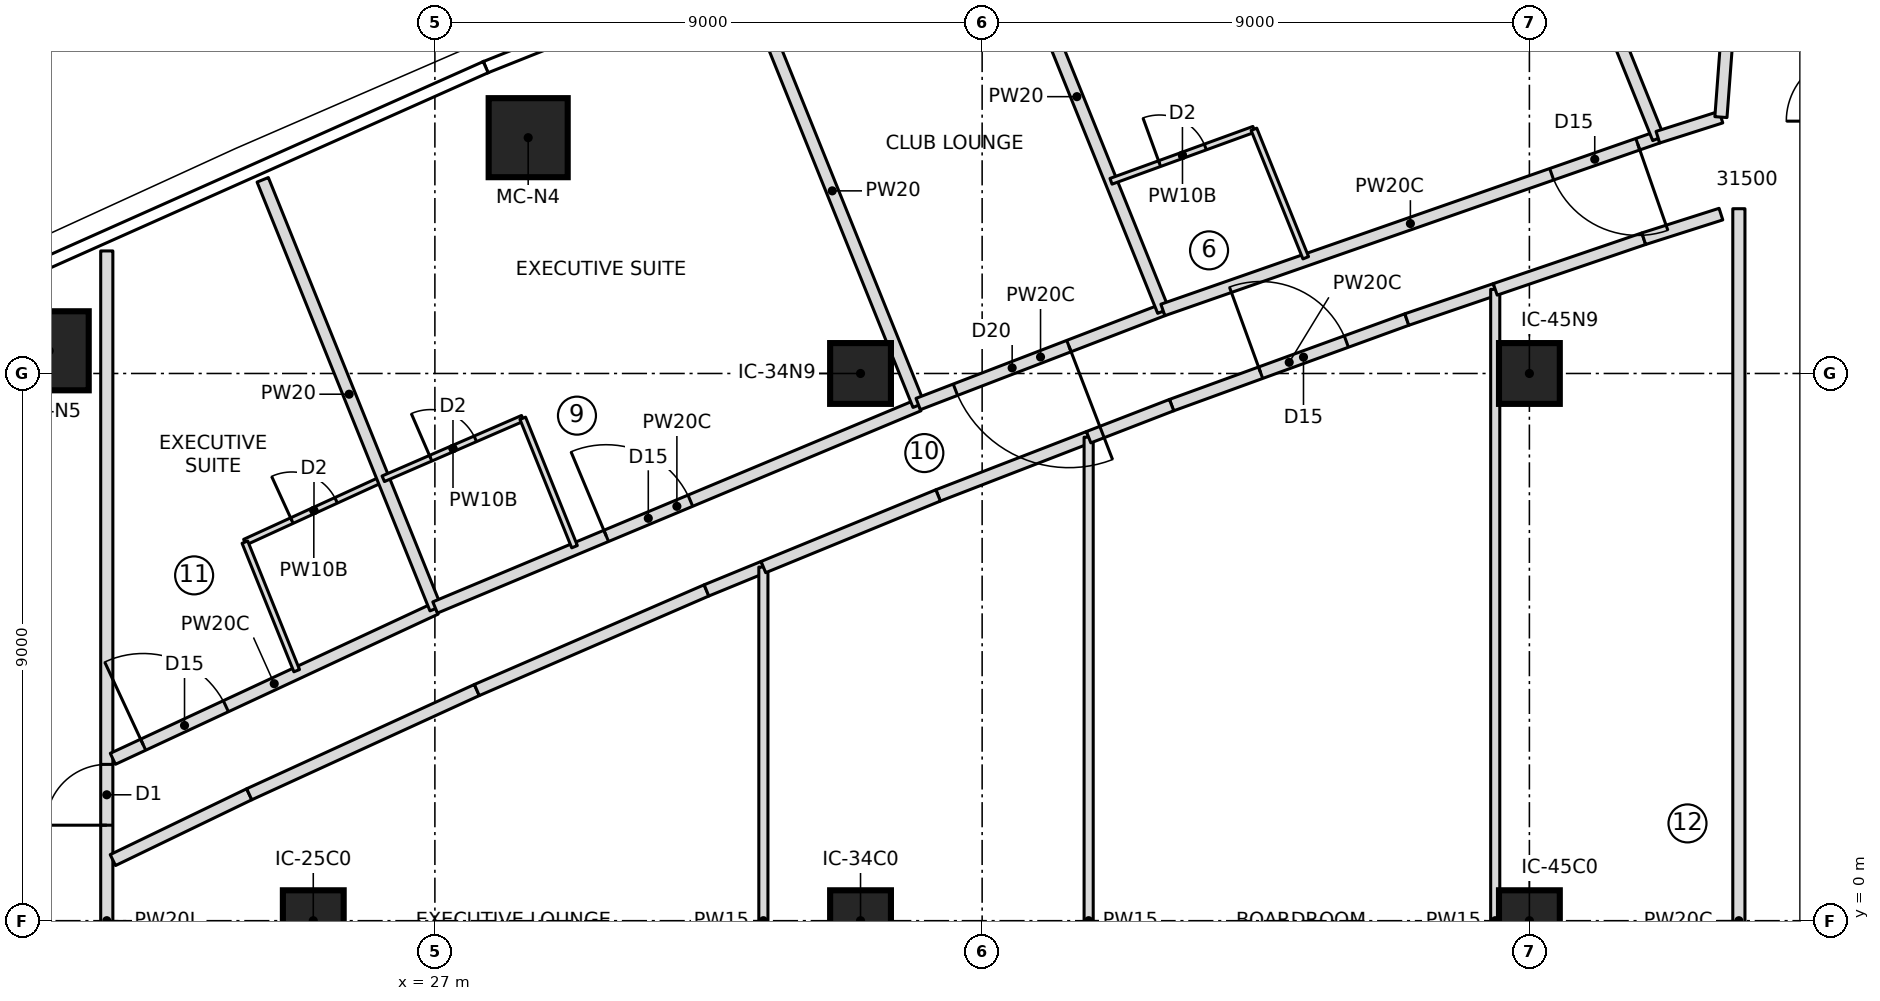
"""IFC4 building model, lengths in metres.
Left out: names, types, materials, properties, quantities, classifications, styles, units other than length and angle.
Written with IfcOpenShell. Run it as: python <this file> out.ifc"""

import sys

from ifc_helpers import new_model, si_unit, direction, frame, frame_2d, origin, origin_2d, place, context, subcontext, project, spatial, rectangle, extrude, element, fill, save


model = new_model("IFC4")
c1 = context("Model", 3, precision=1e-05, world=origin(), true_north=direction((0.0, 1.0)))
c2 = subcontext(c1, "Body", "Model", "MODEL_VIEW")
j1 = project(units=[si_unit("LENGTHUNIT", "METRE"), si_unit("PLANEANGLEUNIT", "RADIAN")], contexts=[c1])
p1 = place(None, origin())
s1 = spatial("IfcSite", under=j1, at=p1, CompositionType="ELEMENT")
p2 = place(p1, origin())
s2 = spatial("IfcBuilding", under=s1, at=p2, CompositionType="ELEMENT")
p3 = place(p2, frame((0.0, 0.0, 200.35)))
s3 = spatial("IfcBuildingStorey", under=s2, at=p3, CompositionType="ELEMENT", Elevation=200.35)
for number, where, z_axis, x_axis in (
    (1, (28.534, 12.878, 0.0), (0.0, 0.0, 1.0), (1.0, 0.0, 0.0)),
    (2, (20.657, 9.373, 0.0), (0.0, 0.0, 1.0), (1.0, 0.0, 0.0)),
):
    element("IfcColumn", number, at=place(p3, frame(where, z_axis=z_axis, x_axis=x_axis)), inside=s3, PredefinedType="COLUMN", context=c2, shape_type="SweptSolid", body=[
        extrude(rectangle(XDim=1.3, YDim=1.3, at=origin_2d()), origin(), (0.0, 0.0, 1.0), 3.55),
    ])
for number, where, z_axis, x_axis in (
    (3, (25.0, 0.0, 0.0), (0.0, 0.0, 1.0), (1.0, 0.0, 0.0)),
    (4, (34.0, 0.0, 0.0), (0.0, 0.0, 1.0), (1.0, 0.0, 0.0)),
    (5, (34.0, 9.0, 0.0), (0.0, 0.0, 1.0), (1.0, 0.0, 0.0)),
    (6, (45.0, 0.0, 0.0), (0.0, 0.0, 1.0), (1.0, 0.0, 0.0)),
    (7, (45.0, 9.0, 0.0), (0.0, 0.0, 1.0), (1.0, 0.0, 0.0)),
):
    element("IfcColumn", number, at=place(p3, frame(where, z_axis=z_axis, x_axis=x_axis)), inside=s3, PredefinedType="COLUMN", context=c2, shape_type="SweptSolid", body=[
        extrude(rectangle(XDim=1.0, YDim=1.0, at=origin_2d()), origin(), (0.0, 0.0, 1.0), 3.55),
    ])
p4 = place(p3, frame((21.604, -11.015, 0.0), z_axis=(0.0, 0.0, 1.0), x_axis=(0.0, 1.0, 0.0)))
e8 = element("IfcWall", 8, at=p4, inside=s3, PredefinedType="PARTITIONING", context=c2, shape_type="SweptSolid", body=[
    extrude(rectangle(XDim=22.031, YDim=0.2, at=frame_2d((11.015, 0.0))), origin(), (0.0, 0.0, 1.0), 3.25),
])
p5 = place(p4, frame((12.586, 0.0, 0.0)))
e9 = element("IfcOpeningElement", 9, at=p5, cuts=e8, PredefinedType="OPENING", context=c2, shape_type="SweptSolid", body=[
    extrude(rectangle(XDim=1.0, YDim=2.1, at=frame_2d((0.5, 1.05))), frame((0.0, 0.11, 0.0), z_axis=(0.0, -1.0, 0.0), x_axis=(1.0, 0.0, 0.0)), (0.0, 0.0, 1.0), 0.22),
])
p6 = place(p4, frame((8.444, 0.0, 0.0)))
e10 = element("IfcOpeningElement", 10, at=p6, cuts=e8, PredefinedType="OPENING", context=c2, shape_type="SweptSolid", body=[
    extrude(rectangle(XDim=1.0, YDim=2.1, at=frame_2d((0.5, 1.05))), frame((0.0, 0.11, 0.0), z_axis=(0.0, -1.0, 0.0), x_axis=(1.0, 0.0, 0.0)), (0.0, 0.0, 1.0), 0.22),
])
p7 = place(p3, frame((21.704, 2.663, 0.0), z_axis=(0.0, 0.0, 1.0), x_axis=(0.906619470853, 0.421949209112, 0.0)))
e11 = element("IfcWall", 11, at=p7, inside=s3, PredefinedType="PARTITIONING", context=c2, shape_type="SweptSolid", body=[
    extrude(rectangle(XDim=5.854, YDim=0.2, at=frame_2d((2.927, 0.0))), origin(), (0.0, 0.0, 1.0), 3.25),
])
p8 = place(p7, frame((0.55, 0.0, 0.0)))
e12 = element("IfcOpeningElement", 12, at=p8, cuts=e11, PredefinedType="OPENING", context=c2, shape_type="SweptSolid", body=[
    extrude(rectangle(XDim=1.5, YDim=2.1, at=frame_2d((0.75, 1.05))), frame((0.0, 0.11, 0.0), z_axis=(0.0, -1.0, 0.0), x_axis=(1.0, 0.0, 0.0)), (0.0, 0.0, 1.0), 0.22),
])
p9 = place(p3, frame((23.875, 6.226, 0.0), z_axis=(0.0, 0.0, 1.0), x_axis=(0.909145169949, 0.416479363183, 0.0)))
e13 = element("IfcWall", 13, at=p9, inside=s3, PredefinedType="PARTITIONING", context=c2, shape_type="SweptSolid", body=[
    extrude(rectangle(XDim=2.493, YDim=0.1, at=frame_2d((1.247, 0.0))), origin(), (0.0, 0.0, 1.0), 3.25),
])
p10 = place(p9, frame((0.85, 0.0, 0.0)))
e14 = element("IfcOpeningElement", 14, at=p10, cuts=e13, PredefinedType="OPENING", context=c2, shape_type="SweptSolid", body=[
    extrude(rectangle(XDim=0.8, YDim=2.1, at=frame_2d((0.4, 1.05))), frame((0.0, 0.06, 0.0), z_axis=(0.0, -1.0, 0.0), x_axis=(1.0, 0.0, 0.0)), (0.0, 0.0, 1.0), 0.12),
])
p11 = place(p3, frame((24.728, 4.112, 0.0), z_axis=(0.0, 0.0, 1.0), x_axis=(-0.373790023037, 0.927513352291, 0.0)))
e15 = element("IfcWall", 15, at=p11, inside=s3, PredefinedType="PARTITIONING", context=c2, shape_type="SweptSolid", body=[
    extrude(rectangle(XDim=2.28, YDim=0.1, at=frame_2d((1.14, 0.0))), origin(), (0.0, 0.0, 1.0), 3.25),
])
p12 = place(p3, frame((27.012, 5.133, 0.0), z_axis=(0.0, 0.0, 1.0), x_axis=(-0.373913547423, 0.927463562116, 0.0)))
e16 = element("IfcWall", 16, at=p12, inside=s3, PredefinedType="PARTITIONING", context=c2, shape_type="SweptSolid", body=[
    extrude(rectangle(XDim=7.604, YDim=0.2, at=frame_2d((3.802, 0.0))), origin(), (0.0, 0.0, 1.0), 3.25),
])
p13 = place(p3, frame((27.004, 5.151, 0.0), z_axis=(0.0, 0.0, 1.0), x_axis=(0.922490953728, 0.386018704586, 0.0)))
e17 = element("IfcWall", 17, at=p13, inside=s3, PredefinedType="PARTITIONING", context=c2, shape_type="SweptSolid", body=[
    extrude(rectangle(XDim=8.62, YDim=0.2, at=frame_2d((4.31, 0.0))), origin(), (0.0, 0.0, 1.0), 3.25),
])
p14 = place(p13, frame((3.05, 0.0, 0.0)))
e18 = element("IfcOpeningElement", 18, at=p14, cuts=e17, PredefinedType="OPENING", context=c2, shape_type="SweptSolid", body=[
    extrude(rectangle(XDim=1.5, YDim=2.1, at=frame_2d((0.75, 1.05))), frame((0.0, 0.11, 0.0), z_axis=(0.0, -1.0, 0.0), x_axis=(1.0, 0.0, 0.0)), (0.0, 0.0, 1.0), 0.22),
])
p15 = place(p3, frame((26.151, 7.268, 0.0), z_axis=(0.0, 0.0, 1.0), x_axis=(0.917378641232, 0.398015613526, 0.0)))
e19 = element("IfcWall", 19, at=p15, inside=s3, PredefinedType="PARTITIONING", context=c2, shape_type="SweptSolid", body=[
    extrude(rectangle(XDim=2.501, YDim=0.1, at=frame_2d((1.25, 0.0))), origin(), (0.0, 0.0, 1.0), 3.25),
])
p16 = place(p15, frame((0.85, 0.0, 0.0)))
e20 = element("IfcOpeningElement", 20, at=p16, cuts=e19, PredefinedType="OPENING", context=c2, shape_type="SweptSolid", body=[
    extrude(rectangle(XDim=0.8, YDim=2.1, at=frame_2d((0.4, 1.05))), frame((0.0, 0.06, 0.0), z_axis=(0.0, -1.0, 0.0), x_axis=(1.0, 0.0, 0.0)), (0.0, 0.0, 1.0), 0.12),
])
p17 = place(p3, frame((28.445, 8.263, 0.0), z_axis=(0.0, 0.0, 1.0), x_axis=(0.373902898623, -0.927467855185, 0.0)))
e21 = element("IfcWall", 21, at=p17, inside=s3, PredefinedType="PARTITIONING", context=c2, shape_type="SweptSolid", body=[
    extrude(rectangle(XDim=2.278, YDim=0.1, at=frame_2d((1.139, 0.0))), origin(), (0.0, 0.0, 1.0), 3.25),
])
p18 = place(p3, frame((34.956, 8.479, 0.0), z_axis=(0.0, 0.0, 1.0), x_axis=(-0.373881438439, 0.927476506436, 0.0)))
e22 = element("IfcWall", 22, at=p18, inside=s3, PredefinedType="PARTITIONING", context=c2, shape_type="SweptSolid", body=[
    extrude(rectangle(XDim=7.601, YDim=0.2, at=frame_2d((3.8, 0.0))), origin(), (0.0, 0.0, 1.0), 3.25),
])
p19 = place(p3, frame((38.972, 10.045, 0.0), z_axis=(0.0, 0.0, 1.0), x_axis=(-0.93335728106, -0.358948723208, 0.0)))
e23 = element("IfcWall", 23, at=p19, inside=s3, PredefinedType="PARTITIONING", context=c2, shape_type="SweptSolid", body=[
    extrude(rectangle(XDim=4.312, YDim=0.2, at=frame_2d((2.156, 0.0))), origin(), (0.0, 0.0, 1.0), 3.25),
])
p20 = place(p19, frame((1.656, 0.0, 0.0)))
e24 = element("IfcOpeningElement", 24, at=p20, cuts=e23, PredefinedType="OPENING", context=c2, shape_type="SweptSolid", body=[
    extrude(rectangle(XDim=2.0, YDim=2.4, at=frame_2d((1.0, 1.2))), frame((0.0, 0.11, 0.0), z_axis=(0.0, -1.0, 0.0), x_axis=(1.0, 0.0, 0.0)), (0.0, 0.0, 1.0), 0.22),
])
p21 = place(p3, frame((38.98, 10.026, 0.0), z_axis=(0.0, 0.0, 1.0), x_axis=(-0.373863662938, 0.927483671843, 0.0)))
e25 = element("IfcWall", 25, at=p21, inside=s3, PredefinedType="PARTITIONING", context=c2, shape_type="SweptSolid", body=[
    extrude(rectangle(XDim=7.604, YDim=0.2, at=frame_2d((3.802, 0.0))), origin(), (0.0, 0.0, 1.0), 3.25),
])
p22 = place(p3, frame((47.113, 12.886, 0.0), z_axis=(0.0, 0.0, 1.0), x_axis=(-0.944155939639, -0.329498955453, 0.0)))
e26 = element("IfcWall", 26, at=p22, inside=s3, PredefinedType="PARTITIONING", context=c2, shape_type="SweptSolid", body=[
    extrude(rectangle(XDim=8.622, YDim=0.2, at=frame_2d((4.311, 0.0))), origin(), (0.0, 0.0, 1.0), 3.25),
])
p23 = place(p22, frame((0.35, 0.0, 0.0)))
e27 = element("IfcOpeningElement", 27, at=p23, cuts=e26, PredefinedType="OPENING", context=c2, shape_type="SweptSolid", body=[
    extrude(rectangle(XDim=1.5, YDim=2.1, at=frame_2d((0.75, 1.05))), frame((0.0, 0.11, 0.0), z_axis=(0.0, -1.0, 0.0), x_axis=(1.0, 0.0, 0.0)), (0.0, 0.0, 1.0), 0.22),
])
p24 = place(p3, frame((38.119, 12.161, 0.0), z_axis=(0.0, 0.0, 1.0), x_axis=(0.939744972593, 0.341876273652, 0.0)))
e28 = element("IfcWall", 28, at=p24, inside=s3, PredefinedType="PARTITIONING", context=c2, shape_type="SweptSolid", body=[
    extrude(rectangle(XDim=2.501, YDim=0.1, at=frame_2d((1.251, 0.0))), origin(), (0.0, 0.0, 1.0), 3.25),
])
p25 = place(p24, frame((0.85, 0.0, 0.0)))
e29 = element("IfcOpeningElement", 29, at=p25, cuts=e28, PredefinedType="OPENING", context=c2, shape_type="SweptSolid", body=[
    extrude(rectangle(XDim=0.8, YDim=2.1, at=frame_2d((0.4, 1.05))), frame((0.0, 0.06, 0.0), z_axis=(0.0, -1.0, 0.0), x_axis=(1.0, 0.0, 0.0)), (0.0, 0.0, 1.0), 0.12),
])
p26 = place(p3, frame((40.47, 13.016, 0.0), z_axis=(0.0, 0.0, 1.0), x_axis=(0.373846436826, -0.927490615409, 0.0)))
e30 = element("IfcWall", 30, at=p26, inside=s3, PredefinedType="PARTITIONING", context=c2, shape_type="SweptSolid", body=[
    extrude(rectangle(XDim=2.279, YDim=0.1, at=frame_2d((1.139, 0.0))), origin(), (0.0, 0.0, 1.0), 3.25),
])
p27 = place(p3, frame((47.121, 12.867, 0.0), z_axis=(0.0, 0.0, 1.0), x_axis=(-0.373907892596, 0.92746584188, 0.0)))
e31 = element("IfcWall", 31, at=p27, inside=s3, PredefinedType="PARTITIONING", context=c2, shape_type="SweptSolid", body=[
    extrude(rectangle(XDim=7.621, YDim=0.2, at=frame_2d((3.811, 0.0))), origin(), (0.0, 0.0, 1.0), 3.25),
])
p28 = place(p3, frame((21.704, 0.997, 0.0), z_axis=(0.0, 0.0, 1.0), x_axis=(0.900633695148, 0.434579045933, 0.0)))
e32 = element("IfcWall", 32, at=p28, inside=s3, PredefinedType="PARTITIONING", context=c2, shape_type="SweptSolid", body=[
    extrude(rectangle(XDim=2.49, YDim=0.2, at=frame_2d((1.245, 0.0))), origin(), (0.0, 0.0, 1.0), 3.25),
])
p29 = place(p3, frame((23.947, 2.079, 0.0), z_axis=(0.0, 0.0, 1.0), x_axis=(0.909180834404, 0.416401501382, 0.0)))
e33 = element("IfcWall", 33, at=p29, inside=s3, PredefinedType="PARTITIONING", context=c2, shape_type="SweptSolid", body=[
    extrude(rectangle(XDim=4.117, YDim=0.2, at=frame_2d((2.059, 0.0))), origin(), (0.0, 0.0, 1.0), 3.25),
])
p30 = place(p3, frame((27.69, 3.793, 0.0), z_axis=(0.0, 0.0, 1.0), x_axis=(0.917375244839, 0.398023441717, 0.0)))
e34 = element("IfcWall", 34, at=p30, inside=s3, PredefinedType="PARTITIONING", context=c2, shape_type="SweptSolid", body=[
    extrude(rectangle(XDim=4.117, YDim=0.2, at=frame_2d((2.059, 0.0))), origin(), (0.0, 0.0, 1.0), 3.25),
])
p31 = place(p3, frame((31.467, 5.432, 0.0), z_axis=(0.0, 0.0, 1.0), x_axis=(0.925212079844, 0.379450401648, 0.0)))
e35 = element("IfcWall", 35, at=p31, inside=s3, PredefinedType="PARTITIONING", context=c2, shape_type="SweptSolid", body=[
    extrude(rectangle(XDim=1.011, YDim=0.2, at=frame_2d((0.506, 0.0))), origin(), (0.0, 0.0, 1.0), 3.25),
])
p32 = place(p3, frame((32.402, -5.816, 0.0), z_axis=(0.0, 0.0, 1.0), x_axis=(0.0, 1.0, 0.0)))
e36 = element("IfcWall", 36, at=p32, inside=s3, PredefinedType="PARTITIONING", context=c2, shape_type="SweptSolid", body=[
    extrude(rectangle(XDim=11.632, YDim=0.15, at=frame_2d((5.816, 0.0))), origin(), (0.0, 0.0, 1.0), 3.25),
])
p33 = place(p3, frame((35.276, 6.994, 0.0), z_axis=(0.0, 0.0, 1.0), x_axis=(0.932689885878, 0.360679326801, 0.0)))
e37 = element("IfcWall", 37, at=p33, inside=s3, PredefinedType="PARTITIONING", context=c2, shape_type="SweptSolid", body=[
    extrude(rectangle(XDim=2.655, YDim=0.2, at=frame_2d((1.327, 0.0))), origin(), (0.0, 0.0, 1.0), 3.25),
])
p34 = place(p3, frame((32.402, 5.816, 0.0), z_axis=(0.0, 0.0, 1.0), x_axis=(0.925204713675, 0.379468362045, 0.0)))
e38 = element("IfcWall", 38, at=p34, inside=s3, PredefinedType="PARTITIONING", context=c2, shape_type="SweptSolid", body=[
    extrude(rectangle(XDim=3.105, YDim=0.2, at=frame_2d((1.553, 0.0))), origin(), (0.0, 0.0, 1.0), 3.25),
])
p35 = place(p3, frame((37.752, -7.952, 0.0), z_axis=(0.0, 0.0, 1.0), x_axis=(0.0, 1.0, 0.0)))
e39 = element("IfcWall", 39, at=p35, inside=s3, PredefinedType="PARTITIONING", context=c2, shape_type="SweptSolid", body=[
    extrude(rectangle(XDim=15.904, YDim=0.15, at=frame_2d((7.952, 0.0))), origin(), (0.0, 0.0, 1.0), 3.25),
])
p36 = place(p3, frame((39.115, 8.479, 0.0), z_axis=(0.0, 0.0, 1.0), x_axis=(0.939727613335, 0.341923986779, 0.0)))
e40 = element("IfcWall", 40, at=p36, inside=s3, PredefinedType="PARTITIONING", context=c2, shape_type="SweptSolid", body=[
    extrude(rectangle(XDim=4.117, YDim=0.2, at=frame_2d((2.059, 0.0))), origin(), (0.0, 0.0, 1.0), 3.25),
])
p37 = place(p36, frame((1.559, 0.0, 0.0)))
e41 = element("IfcOpeningElement", 41, at=p37, cuts=e40, PredefinedType="OPENING", context=c2, shape_type="SweptSolid", body=[
    extrude(rectangle(XDim=1.5, YDim=2.1, at=frame_2d((0.75, 1.05))), frame((0.0, 0.11, 0.0), z_axis=(0.0, -1.0, 0.0), x_axis=(1.0, 0.0, 0.0)), (0.0, 0.0, 1.0), 0.22),
])
p38 = place(p3, frame((42.984, 9.887, 0.0), z_axis=(0.0, 0.0, 1.0), x_axis=(0.946450589454, 0.32284869788, 0.0)))
e42 = element("IfcWall", 42, at=p38, inside=s3, PredefinedType="PARTITIONING", context=c2, shape_type="SweptSolid", body=[
    extrude(rectangle(XDim=1.536, YDim=0.2, at=frame_2d((0.768, 0.0))), origin(), (0.0, 0.0, 1.0), 3.25),
])
p39 = place(p3, frame((37.752, 7.952, 0.0), z_axis=(0.0, 0.0, 1.0), x_axis=(0.932642417559, 0.360802052335, 0.0)))
e43 = element("IfcWall", 43, at=p39, inside=s3, PredefinedType="PARTITIONING", context=c2, shape_type="SweptSolid", body=[
    extrude(rectangle(XDim=1.462, YDim=0.2, at=frame_2d((0.731, 0.0))), origin(), (0.0, 0.0, 1.0), 3.25),
])
p40 = place(p3, frame((44.438, -10.383, 0.0), z_axis=(0.0, 0.0, 1.0), x_axis=(0.0, 1.0, 0.0)))
e44 = element("IfcWall", 44, at=p40, inside=s3, PredefinedType="PARTITIONING", context=c2, shape_type="SweptSolid", body=[
    extrude(rectangle(XDim=20.766, YDim=0.15, at=frame_2d((10.383, 0.0))), origin(), (0.0, 0.0, 1.0), 3.25),
])
p41 = place(p3, frame((44.438, 10.383, 0.0), z_axis=(0.0, 0.0, 1.0), x_axis=(0.946427432629, 0.322916575554, 0.0)))
e45 = element("IfcWall", 45, at=p41, inside=s3, PredefinedType="PARTITIONING", context=c2, shape_type="SweptSolid", body=[
    extrude(rectangle(XDim=2.581, YDim=0.2, at=frame_2d((1.291, 0.0))), origin(), (0.0, 0.0, 1.0), 3.25),
])
p42 = place(p3, frame((48.15, 13.217, 0.0), z_axis=(0.0, 0.0, 1.0), x_axis=(-0.952731090451, -0.303814860215, 0.0)))
e46 = element("IfcWall", 46, at=p42, inside=s3, PredefinedType="PARTITIONING", context=c2, shape_type="SweptSolid", body=[
    extrude(rectangle(XDim=1.088, YDim=0.2, at=frame_2d((0.544, 0.0))), origin(), (0.0, 0.0, 1.0), 3.25),
])
p43 = place(p3, frame((46.881, 11.217, 0.0), z_axis=(0.0, 0.0, 1.0), x_axis=(0.952761948983, 0.303718074157, 0.0)))
e47 = element("IfcWall", 47, at=p43, inside=s3, PredefinedType="PARTITIONING", context=c2, shape_type="SweptSolid", body=[
    extrude(rectangle(XDim=1.332, YDim=0.2, at=frame_2d((0.666, 0.0))), origin(), (0.0, 0.0, 1.0), 3.25),
])
p44 = place(p3, frame((48.445, 17.145, 0.0), z_axis=(0.0, 0.0, 1.0), x_axis=(-0.074933243819, -0.997188552366, 0.0)))
e48 = element("IfcWall", 48, at=p44, inside=s3, PredefinedType="PARTITIONING", context=c2, shape_type="SweptSolid", body=[
    extrude(rectangle(XDim=3.939, YDim=0.2, at=frame_2d((1.969, 0.0))), origin(), (0.0, 0.0, 1.0), 3.25),
])
p45 = place(p44, frame((1.47, 0.0, 0.0)))
e49 = element("IfcOpeningElement", 49, at=p45, cuts=e48, PredefinedType="OPENING", context=c2, shape_type="SweptSolid", body=[
    extrude(rectangle(XDim=1.0, YDim=2.1, at=frame_2d((0.5, 1.05))), frame((0.0, 0.11, 0.0), z_axis=(0.0, -1.0, 0.0), x_axis=(1.0, 0.0, 0.0)), (0.0, 0.0, 1.0), 0.22),
])
p46 = place(p3, frame((48.445, 11.71, 0.0), z_axis=(0.0, 0.0, 1.0), x_axis=(0.0, -1.0, 0.0)))
e50 = element("IfcWall", 50, at=p46, inside=s3, PredefinedType="PARTITIONING", context=c2, shape_type="SweptSolid", body=[
    extrude(rectangle(XDim=23.42, YDim=0.2, at=frame_2d((11.71, 0.0))), origin(), (0.0, 0.0, 1.0), 3.25),
])
p47 = place(p5, origin())
e51 = element("IfcDoor", 51, at=p47, inside=s3, OperationType="SINGLE_SWING_LEFT", PredefinedType="DOOR", context=c2, shape_type="SweptSolid", body=[
    extrude(rectangle(XDim=1.0, YDim=2.1, at=frame_2d((0.5, 1.05))), frame((0.0, 0.025, 0.0), z_axis=(0.0, -1.0, 0.0), x_axis=(1.0, 0.0, 0.0)), (0.0, 0.0, 1.0), 0.05),
])
fill(e9, e51)
p48 = place(p10, origin())
e52 = element("IfcDoor", 52, at=p48, inside=s3, OperationType="SINGLE_SWING_LEFT", PredefinedType="DOOR", context=c2, shape_type="SweptSolid", body=[
    extrude(rectangle(XDim=0.8, YDim=2.1, at=frame_2d((0.4, 1.05))), frame((0.0, 0.025, 0.0), z_axis=(0.0, -1.0, 0.0), x_axis=(1.0, 0.0, 0.0)), (0.0, 0.0, 1.0), 0.05),
])
fill(e14, e52)
p49 = place(p8, origin())
e53 = element("IfcDoor", 53, at=p49, inside=s3, OperationType="DOUBLE_DOOR_SINGLE_SWING", PredefinedType="DOOR", context=c2, shape_type="SweptSolid", body=[
    extrude(rectangle(XDim=1.5, YDim=2.1, at=frame_2d((0.75, 1.05))), frame((0.0, 0.025, 0.0), z_axis=(0.0, -1.0, 0.0), x_axis=(1.0, 0.0, 0.0)), (0.0, 0.0, 1.0), 0.05),
])
fill(e12, e53)
p50 = place(p16, origin())
e54 = element("IfcDoor", 54, at=p50, inside=s3, OperationType="SINGLE_SWING_LEFT", PredefinedType="DOOR", context=c2, shape_type="SweptSolid", body=[
    extrude(rectangle(XDim=0.8, YDim=2.1, at=frame_2d((0.4, 1.05))), frame((0.0, 0.025, 0.0), z_axis=(0.0, -1.0, 0.0), x_axis=(1.0, 0.0, 0.0)), (0.0, 0.0, 1.0), 0.05),
])
fill(e20, e54)
p51 = place(p14, origin())
e55 = element("IfcDoor", 55, at=p51, inside=s3, OperationType="DOUBLE_DOOR_SINGLE_SWING", PredefinedType="DOOR", context=c2, shape_type="SweptSolid", body=[
    extrude(rectangle(XDim=1.5, YDim=2.1, at=frame_2d((0.75, 1.05))), frame((0.0, 0.025, 0.0), z_axis=(0.0, -1.0, 0.0), x_axis=(1.0, 0.0, 0.0)), (0.0, 0.0, 1.0), 0.05),
])
fill(e18, e55)
p52 = place(p20, origin())
e56 = element("IfcDoor", 56, at=p52, inside=s3, OperationType="DOUBLE_DOOR_SINGLE_SWING", PredefinedType="DOOR", context=c2, shape_type="SweptSolid", body=[
    extrude(rectangle(XDim=2.0, YDim=2.4, at=frame_2d((1.0, 1.2))), frame((0.0, 0.025, 0.0), z_axis=(0.0, -1.0, 0.0), x_axis=(1.0, 0.0, 0.0)), (0.0, 0.0, 1.0), 0.05),
])
fill(e24, e56)
p53 = place(p25, origin())
e57 = element("IfcDoor", 57, at=p53, inside=s3, OperationType="SINGLE_SWING_LEFT", PredefinedType="DOOR", context=c2, shape_type="SweptSolid", body=[
    extrude(rectangle(XDim=0.8, YDim=2.1, at=frame_2d((0.4, 1.05))), frame((0.0, 0.025, 0.0), z_axis=(0.0, -1.0, 0.0), x_axis=(1.0, 0.0, 0.0)), (0.0, 0.0, 1.0), 0.05),
])
fill(e29, e57)
p54 = place(p23, origin())
e58 = element("IfcDoor", 58, at=p54, inside=s3, OperationType="DOUBLE_DOOR_SINGLE_SWING", PredefinedType="DOOR", context=c2, shape_type="SweptSolid", body=[
    extrude(rectangle(XDim=1.5, YDim=2.1, at=frame_2d((0.75, 1.05))), frame((0.0, 0.025, 0.0), z_axis=(0.0, -1.0, 0.0), x_axis=(1.0, 0.0, 0.0)), (0.0, 0.0, 1.0), 0.05),
])
fill(e27, e58)
p55 = place(p37, origin())
e59 = element("IfcDoor", 59, at=p55, inside=s3, OperationType="DOUBLE_DOOR_SINGLE_SWING", PredefinedType="DOOR", context=c2, shape_type="SweptSolid", body=[
    extrude(rectangle(XDim=1.5, YDim=2.1, at=frame_2d((0.75, 1.05))), frame((0.0, 0.025, 0.0), z_axis=(0.0, -1.0, 0.0), x_axis=(1.0, 0.0, 0.0)), (0.0, 0.0, 1.0), 0.05),
])
fill(e41, e59)
save(model, sys.argv[1])
